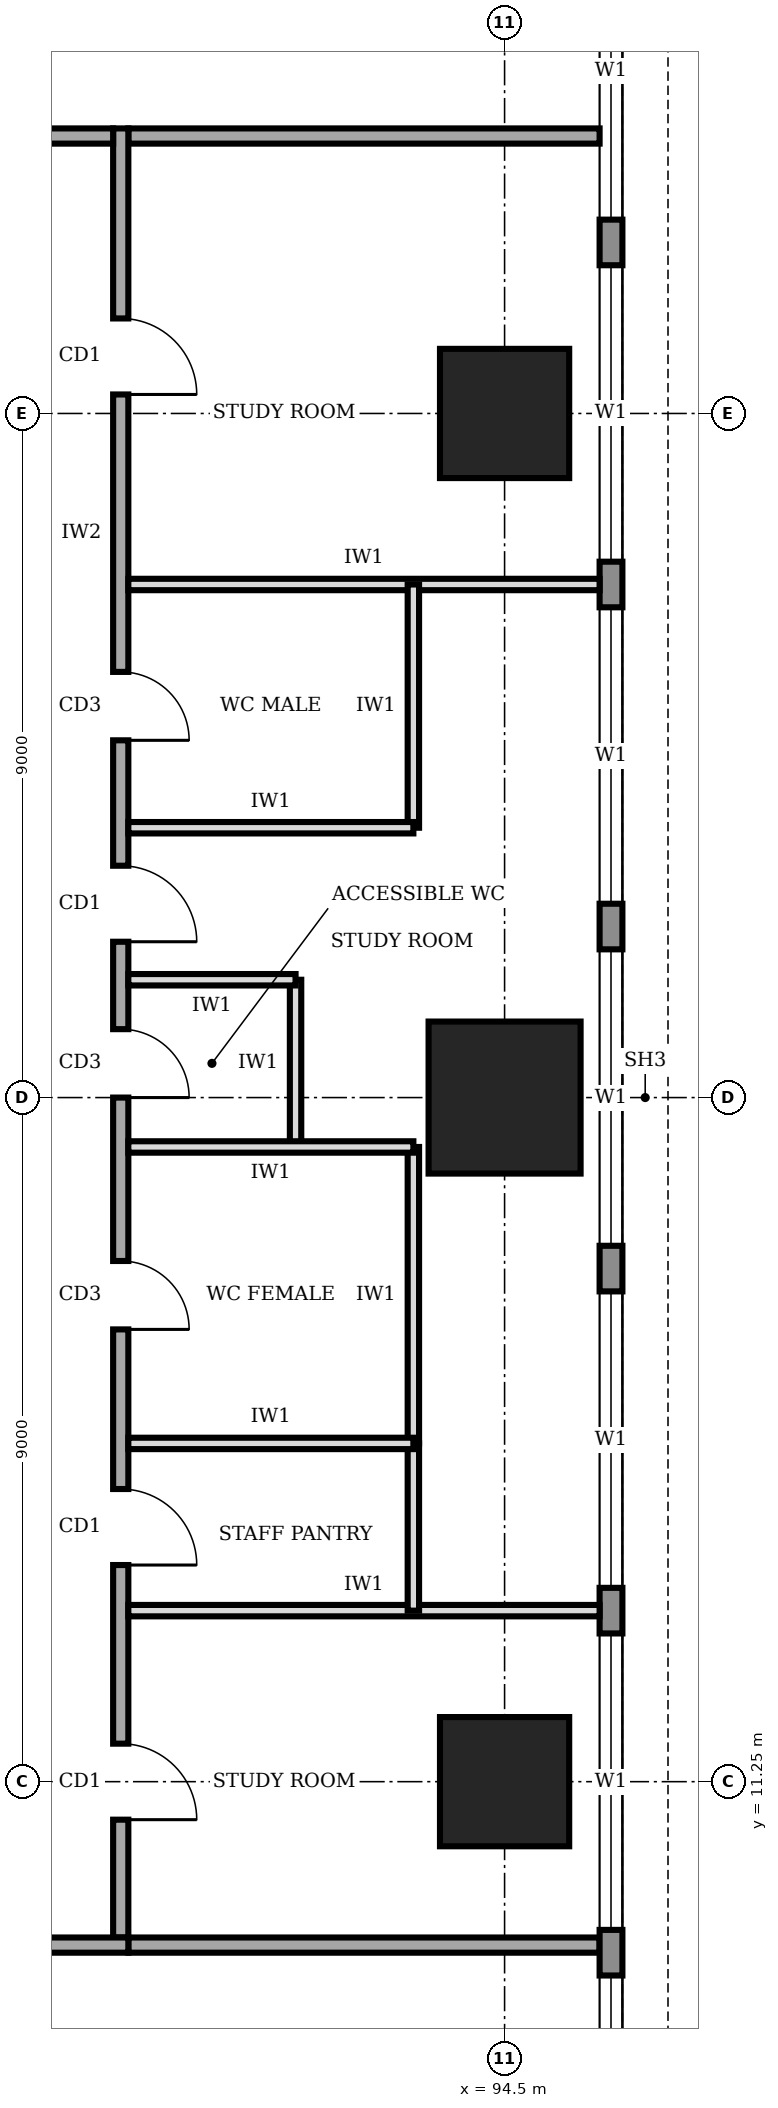
"""IFC4 building model, lengths in metres.
Left out: names, types, materials, properties, quantities, classifications, styles, units other than length and angle.
Written with IfcOpenShell. Run it as: python <this file> out.ifc"""

import sys

from ifc_helpers import new_model, si_unit, direction, frame, frame_2d, origin, origin_2d, place, context, subcontext, project, spatial, rectangle, extrude, element, fill, save


model = new_model("IFC4")
c1 = context("Model", 3, precision=1e-05, world=origin(), true_north=direction((0.0, 1.0)))
c2 = subcontext(c1, "Body", "Model", "MODEL_VIEW")
j1 = project(units=[si_unit("LENGTHUNIT", "METRE"), si_unit("PLANEANGLEUNIT", "RADIAN")], contexts=[c1])
p1 = place(None, origin())
s1 = spatial("IfcSite", under=j1, at=p1, CompositionType="ELEMENT")
p2 = place(p1, origin())
s2 = spatial("IfcBuilding", under=s1, at=p2, CompositionType="ELEMENT")
p3 = place(p2, frame((0.0, 0.0, 221.0)))
s3 = spatial("IfcBuildingStorey", under=s2, at=p3, CompositionType="ELEMENT", Elevation=221.0)
p4 = place(p3, frame((94.5, 11.25, 0.0), z_axis=(0.0, 0.0, 1.0), x_axis=(1.0, 0.0, 0.0)))
e1 = element("IfcColumn", 1, at=p4, inside=s3, PredefinedType="COLUMN", context=c2, shape_type="SweptSolid", body=[
    extrude(rectangle(XDim=1.7, YDim=1.7, at=origin_2d()), origin(), (0.0, 0.0, 1.0), 4.0),
])
p5 = place(p3, frame((94.5, 20.25, 0.0), z_axis=(0.0, 0.0, 1.0), x_axis=(1.0, 0.0, 0.0)))
e2 = element("IfcColumn", 2, at=p5, inside=s3, PredefinedType="COLUMN", context=c2, shape_type="SweptSolid", body=[
    extrude(rectangle(XDim=2.0, YDim=2.0, at=origin_2d()), origin(), (0.0, 0.0, 1.0), 4.0),
])
p6 = place(p3, frame((94.5, 29.25, 0.0), z_axis=(0.0, 0.0, 1.0), x_axis=(1.0, 0.0, 0.0)))
e3 = element("IfcColumn", 3, at=p6, inside=s3, PredefinedType="COLUMN", context=c2, shape_type="SweptSolid", body=[
    extrude(rectangle(XDim=1.7, YDim=1.7, at=origin_2d()), origin(), (0.0, 0.0, 1.0), 4.0),
])
p7 = place(p3, frame((95.9, 3.32, 0.0), z_axis=(0.0, 0.0, 1.0), x_axis=(0.0, 1.0, 0.0)))
e4 = element("IfcWall", 4, at=p7, inside=s3, PredefinedType="STANDARD", context=c2, shape_type="SweptSolid", body=[
    extrude(rectangle(XDim=33.86, YDim=0.3, at=frame_2d((16.93, 0.0))), origin(), (0.0, 0.0, 1.0), 3.75),
])
p8 = place(p7, frame((1.48, 0.0, 0.9)))
e5 = element("IfcOpeningElement", 5, at=p8, cuts=e4, PredefinedType="OPENING", context=c2, shape_type="SweptSolid", body=[
    extrude(rectangle(XDim=3.9, YDim=2.2, at=frame_2d((1.95, 1.1))), frame((0.0, 0.16, 0.0), z_axis=(0.0, -1.0, 0.0), x_axis=(1.0, 0.0, 0.0)), (0.0, 0.0, 1.0), 0.32),
])
p9 = place(p7, frame((5.98, 0.0, 0.9)))
e6 = element("IfcOpeningElement", 6, at=p9, cuts=e4, PredefinedType="OPENING", context=c2, shape_type="SweptSolid", body=[
    extrude(rectangle(XDim=3.9, YDim=2.2, at=frame_2d((1.95, 1.1))), frame((0.0, 0.16, 0.0), z_axis=(0.0, -1.0, 0.0), x_axis=(1.0, 0.0, 0.0)), (0.0, 0.0, 1.0), 0.32),
])
p10 = place(p7, frame((10.48, 0.0, 0.9)))
e7 = element("IfcOpeningElement", 7, at=p10, cuts=e4, PredefinedType="OPENING", context=c2, shape_type="SweptSolid", body=[
    extrude(rectangle(XDim=3.9, YDim=2.2, at=frame_2d((1.95, 1.1))), frame((0.0, 0.16, 0.0), z_axis=(0.0, -1.0, 0.0), x_axis=(1.0, 0.0, 0.0)), (0.0, 0.0, 1.0), 0.32),
])
p11 = place(p7, frame((14.98, 0.0, 0.9)))
e8 = element("IfcOpeningElement", 8, at=p11, cuts=e4, PredefinedType="OPENING", context=c2, shape_type="SweptSolid", body=[
    extrude(rectangle(XDim=3.9, YDim=2.2, at=frame_2d((1.95, 1.1))), frame((0.0, 0.16, 0.0), z_axis=(0.0, -1.0, 0.0), x_axis=(1.0, 0.0, 0.0)), (0.0, 0.0, 1.0), 0.32),
])
p12 = place(p7, frame((19.48, 0.0, 0.9)))
e9 = element("IfcOpeningElement", 9, at=p12, cuts=e4, PredefinedType="OPENING", context=c2, shape_type="SweptSolid", body=[
    extrude(rectangle(XDim=3.9, YDim=2.2, at=frame_2d((1.95, 1.1))), frame((0.0, 0.16, 0.0), z_axis=(0.0, -1.0, 0.0), x_axis=(1.0, 0.0, 0.0)), (0.0, 0.0, 1.0), 0.32),
])
p13 = place(p7, frame((23.98, 0.0, 0.9)))
e10 = element("IfcOpeningElement", 10, at=p13, cuts=e4, PredefinedType="OPENING", context=c2, shape_type="SweptSolid", body=[
    extrude(rectangle(XDim=3.9, YDim=2.2, at=frame_2d((1.95, 1.1))), frame((0.0, 0.16, 0.0), z_axis=(0.0, -1.0, 0.0), x_axis=(1.0, 0.0, 0.0)), (0.0, 0.0, 1.0), 0.32),
])
p14 = place(p7, frame((28.48, 0.0, 0.9)))
e11 = element("IfcOpeningElement", 11, at=p14, cuts=e4, PredefinedType="OPENING", context=c2, shape_type="SweptSolid", body=[
    extrude(rectangle(XDim=3.9, YDim=2.2, at=frame_2d((1.95, 1.1))), frame((0.0, 0.16, 0.0), z_axis=(0.0, -1.0, 0.0), x_axis=(1.0, 0.0, 0.0)), (0.0, 0.0, 1.0), 0.32),
])
p15 = place(p3, frame((72.65, 9.1, 0.0), z_axis=(0.0, 0.0, 1.0), x_axis=(1.0, 0.0, 0.0)))
e12 = element("IfcWall", 12, at=p15, inside=s3, PredefinedType="SOLIDWALL", context=c2, shape_type="SweptSolid", body=[
    extrude(rectangle(XDim=16.9, YDim=0.2, at=frame_2d((8.45, 0.0))), origin(), (0.0, 0.0, 1.0), 3.75),
])
p16 = place(p3, frame((89.45, 9.2, 0.0), z_axis=(0.0, 0.0, 1.0), x_axis=(0.0, 1.0, 0.0)))
e13 = element("IfcWall", 13, at=p16, inside=s3, PredefinedType="SOLIDWALL", context=c2, shape_type="SweptSolid", body=[
    extrude(rectangle(XDim=23.8, YDim=0.2, at=frame_2d((11.9, 0.0))), origin(), (0.0, 0.0, 1.0), 3.75),
])
p17 = place(p16, frame((1.55, 0.0, 0.0)))
e14 = element("IfcOpeningElement", 14, at=p17, cuts=e13, PredefinedType="OPENING", context=c2, shape_type="SweptSolid", body=[
    extrude(rectangle(XDim=1.0, YDim=2.1, at=frame_2d((0.5, 1.05))), frame((0.0, 0.11, 0.0), z_axis=(0.0, -1.0, 0.0), x_axis=(1.0, 0.0, 0.0)), (0.0, 0.0, 1.0), 0.22),
])
p18 = place(p16, frame((4.9, 0.0, 0.0)))
e15 = element("IfcOpeningElement", 15, at=p18, cuts=e13, PredefinedType="OPENING", context=c2, shape_type="SweptSolid", body=[
    extrude(rectangle(XDim=1.0, YDim=2.1, at=frame_2d((0.5, 1.05))), frame((0.0, 0.11, 0.0), z_axis=(0.0, -1.0, 0.0), x_axis=(1.0, 0.0, 0.0)), (0.0, 0.0, 1.0), 0.22),
])
p19 = place(p16, frame((8.0, 0.0, 0.0)))
e16 = element("IfcOpeningElement", 16, at=p19, cuts=e13, PredefinedType="OPENING", context=c2, shape_type="SweptSolid", body=[
    extrude(rectangle(XDim=0.9, YDim=2.1, at=frame_2d((0.45, 1.05))), frame((0.0, 0.11, 0.0), z_axis=(0.0, -1.0, 0.0), x_axis=(1.0, 0.0, 0.0)), (0.0, 0.0, 1.0), 0.22),
])
p20 = place(p16, frame((11.05, 0.0, 0.0)))
e17 = element("IfcOpeningElement", 17, at=p20, cuts=e13, PredefinedType="OPENING", context=c2, shape_type="SweptSolid", body=[
    extrude(rectangle(XDim=0.9, YDim=2.1, at=frame_2d((0.45, 1.05))), frame((0.0, 0.11, 0.0), z_axis=(0.0, -1.0, 0.0), x_axis=(1.0, 0.0, 0.0)), (0.0, 0.0, 1.0), 0.22),
])
p21 = place(p16, frame((15.75, 0.0, 0.0)))
e18 = element("IfcOpeningElement", 18, at=p21, cuts=e13, PredefinedType="OPENING", context=c2, shape_type="SweptSolid", body=[
    extrude(rectangle(XDim=0.9, YDim=2.1, at=frame_2d((0.45, 1.05))), frame((0.0, 0.11, 0.0), z_axis=(0.0, -1.0, 0.0), x_axis=(1.0, 0.0, 0.0)), (0.0, 0.0, 1.0), 0.22),
])
p22 = place(p16, frame((13.1, 0.0, 0.0)))
e19 = element("IfcOpeningElement", 19, at=p22, cuts=e13, PredefinedType="OPENING", context=c2, shape_type="SweptSolid", body=[
    extrude(rectangle(XDim=1.0, YDim=2.1, at=frame_2d((0.5, 1.05))), frame((0.0, 0.11, 0.0), z_axis=(0.0, -1.0, 0.0), x_axis=(1.0, 0.0, 0.0)), (0.0, 0.0, 1.0), 0.22),
])
p23 = place(p16, frame((20.3, 0.0, 0.0)))
e20 = element("IfcOpeningElement", 20, at=p23, cuts=e13, PredefinedType="OPENING", context=c2, shape_type="SweptSolid", body=[
    extrude(rectangle(XDim=1.0, YDim=2.1, at=frame_2d((0.5, 1.05))), frame((0.0, 0.11, 0.0), z_axis=(0.0, -1.0, 0.0), x_axis=(1.0, 0.0, 0.0)), (0.0, 0.0, 1.0), 0.22),
])
p24 = place(p3, frame((89.35, 32.9, 0.0), z_axis=(0.0, 0.0, 1.0), x_axis=(-1.0, 0.0, 0.0)))
e21 = element("IfcWall", 21, at=p24, inside=s3, PredefinedType="SOLIDWALL", context=c2, shape_type="SweptSolid", body=[
    extrude(rectangle(XDim=16.9, YDim=0.2, at=frame_2d((8.45, 0.0))), origin(), (0.0, 0.0, 1.0), 3.75),
])
p25 = place(p24, frame((14.375, 0.0, 0.0)))
e22 = element("IfcOpeningElement", 22, at=p25, cuts=e21, PredefinedType="OPENING", context=c2, shape_type="SweptSolid", body=[
    extrude(rectangle(XDim=1.0, YDim=2.1, at=frame_2d((0.5, 1.05))), frame((0.0, 0.11, 0.0), z_axis=(0.0, -1.0, 0.0), x_axis=(1.0, 0.0, 0.0)), (0.0, 0.0, 1.0), 0.22),
])
p26 = place(p24, frame((1.325, 0.0, 0.0)))
e23 = element("IfcOpeningElement", 23, at=p26, cuts=e21, PredefinedType="OPENING", context=c2, shape_type="SweptSolid", body=[
    extrude(rectangle(XDim=1.0, YDim=2.1, at=frame_2d((0.5, 1.05))), frame((0.0, 0.11, 0.0), z_axis=(0.0, -1.0, 0.0), x_axis=(1.0, 0.0, 0.0)), (0.0, 0.0, 1.0), 0.22),
])
for number, where, z_axis, x_axis in (
    (24, (89.55, 9.1, 0.0), (0.0, 0.0, 1.0), (1.0, 0.0, 0.0)),
    (25, (89.55, 32.9, 0.0), (0.0, 0.0, 1.0), (1.0, 0.0, 0.0)),
):
    element("IfcWall", number, at=place(p3, frame(where, z_axis=z_axis, x_axis=x_axis)), inside=s3, PredefinedType="SOLIDWALL", context=c2, shape_type="SweptSolid", body=[
        extrude(rectangle(XDim=6.2, YDim=0.2, at=frame_2d((3.1, 0.0))), origin(), (0.0, 0.0, 1.0), 3.75),
    ])
for number, where, z_axis, x_axis in (
    (26, (89.55, 13.5, 0.0), (0.0, 0.0, 1.0), (1.0, 0.0, 0.0)),
    (27, (89.55, 27.0, 0.0), (0.0, 0.0, 1.0), (1.0, 0.0, 0.0)),
):
    element("IfcWall", number, at=place(p3, frame(where, z_axis=z_axis, x_axis=x_axis)), inside=s3, PredefinedType="PARTITIONING", context=c2, shape_type="SweptSolid", body=[
        extrude(rectangle(XDim=6.2, YDim=0.15, at=frame_2d((3.1, 0.0))), origin(), (0.0, 0.0, 1.0), 3.75),
    ])
p27 = place(p3, frame((89.55, 15.7, 0.0), z_axis=(0.0, 0.0, 1.0), x_axis=(1.0, 0.0, 0.0)))
e28 = element("IfcWall", 28, at=p27, inside=s3, PredefinedType="PARTITIONING", context=c2, shape_type="SweptSolid", body=[
    extrude(rectangle(XDim=3.75, YDim=0.15, at=frame_2d((1.875, 0.0))), origin(), (0.0, 0.0, 1.0), 3.75),
])
p28 = place(p3, frame((89.55, 19.6, 0.0), z_axis=(0.0, 0.0, 1.0), x_axis=(1.0, 0.0, 0.0)))
e29 = element("IfcWall", 29, at=p28, inside=s3, PredefinedType="PARTITIONING", context=c2, shape_type="SweptSolid", body=[
    extrude(rectangle(XDim=3.75, YDim=0.15, at=frame_2d((1.875, 0.0))), origin(), (0.0, 0.0, 1.0), 2.85),
])
p29 = place(p3, frame((89.55, 21.8, 0.0), z_axis=(0.0, 0.0, 1.0), x_axis=(1.0, 0.0, 0.0)))
e30 = element("IfcWall", 30, at=p29, inside=s3, PredefinedType="PARTITIONING", context=c2, shape_type="SweptSolid", body=[
    extrude(rectangle(XDim=2.2, YDim=0.15, at=frame_2d((1.1, 0.0))), origin(), (0.0, 0.0, 1.0), 3.75),
])
p30 = place(p3, frame((89.55, 23.8, 0.0), z_axis=(0.0, 0.0, 1.0), x_axis=(1.0, 0.0, 0.0)))
e31 = element("IfcWall", 31, at=p30, inside=s3, PredefinedType="PARTITIONING", context=c2, shape_type="SweptSolid", body=[
    extrude(rectangle(XDim=3.75, YDim=0.15, at=frame_2d((1.875, 0.0))), origin(), (0.0, 0.0, 1.0), 3.75),
])
p31 = place(p3, frame((93.3, 13.5, 0.0), z_axis=(0.0, 0.0, 1.0), x_axis=(0.0, 1.0, 0.0)))
e32 = element("IfcWall", 32, at=p31, inside=s3, PredefinedType="PARTITIONING", context=c2, shape_type="SweptSolid", body=[
    extrude(rectangle(XDim=2.2, YDim=0.15, at=frame_2d((1.1, 0.0))), origin(), (0.0, 0.0, 1.0), 3.75),
])
p32 = place(p3, frame((93.3, 15.7, 0.0), z_axis=(0.0, 0.0, 1.0), x_axis=(0.0, 1.0, 0.0)))
e33 = element("IfcWall", 33, at=p32, inside=s3, PredefinedType="PARTITIONING", context=c2, shape_type="SweptSolid", body=[
    extrude(rectangle(XDim=3.9, YDim=0.15, at=frame_2d((1.95, 0.0))), origin(), (0.0, 0.0, 1.0), 3.75),
])
p33 = place(p3, frame((91.75, 19.6, 0.0), z_axis=(0.0, 0.0, 1.0), x_axis=(0.0, 1.0, 0.0)))
e34 = element("IfcWall", 34, at=p33, inside=s3, PredefinedType="PARTITIONING", context=c2, shape_type="SweptSolid", body=[
    extrude(rectangle(XDim=2.2, YDim=0.15, at=frame_2d((1.1, 0.0))), origin(), (0.0, 0.0, 1.0), 3.75),
])
p34 = place(p3, frame((93.3, 23.8, 0.0), z_axis=(0.0, 0.0, 1.0), x_axis=(0.0, 1.0, 0.0)))
e35 = element("IfcWall", 35, at=p34, inside=s3, PredefinedType="PARTITIONING", context=c2, shape_type="SweptSolid", body=[
    extrude(rectangle(XDim=3.2, YDim=0.15, at=frame_2d((1.6, 0.0))), origin(), (0.0, 0.0, 1.0), 3.75),
])
p35 = place(p8, origin())
e36 = element("IfcWindow", 36, at=p35, inside=s3, PartitioningType="SINGLE_PANEL", PredefinedType="WINDOW", context=c2, shape_type="SweptSolid", body=[
    extrude(rectangle(XDim=3.9, YDim=2.2, at=frame_2d((1.95, 1.1))), frame((0.0, 0.03, 0.0), z_axis=(0.0, -1.0, 0.0), x_axis=(1.0, 0.0, 0.0)), (0.0, 0.0, 1.0), 0.06),
])
fill(e5, e36)
p36 = place(p9, origin())
e37 = element("IfcWindow", 37, at=p36, inside=s3, PartitioningType="SINGLE_PANEL", PredefinedType="WINDOW", context=c2, shape_type="SweptSolid", body=[
    extrude(rectangle(XDim=3.9, YDim=2.2, at=frame_2d((1.95, 1.1))), frame((0.0, 0.03, 0.0), z_axis=(0.0, -1.0, 0.0), x_axis=(1.0, 0.0, 0.0)), (0.0, 0.0, 1.0), 0.06),
])
fill(e6, e37)
p37 = place(p10, origin())
e38 = element("IfcWindow", 38, at=p37, inside=s3, PartitioningType="SINGLE_PANEL", PredefinedType="WINDOW", context=c2, shape_type="SweptSolid", body=[
    extrude(rectangle(XDim=3.9, YDim=2.2, at=frame_2d((1.95, 1.1))), frame((0.0, 0.03, 0.0), z_axis=(0.0, -1.0, 0.0), x_axis=(1.0, 0.0, 0.0)), (0.0, 0.0, 1.0), 0.06),
])
fill(e7, e38)
p38 = place(p11, origin())
e39 = element("IfcWindow", 39, at=p38, inside=s3, PartitioningType="SINGLE_PANEL", PredefinedType="WINDOW", context=c2, shape_type="SweptSolid", body=[
    extrude(rectangle(XDim=3.9, YDim=2.2, at=frame_2d((1.95, 1.1))), frame((0.0, 0.03, 0.0), z_axis=(0.0, -1.0, 0.0), x_axis=(1.0, 0.0, 0.0)), (0.0, 0.0, 1.0), 0.06),
])
fill(e8, e39)
p39 = place(p12, origin())
e40 = element("IfcWindow", 40, at=p39, inside=s3, PartitioningType="SINGLE_PANEL", PredefinedType="WINDOW", context=c2, shape_type="SweptSolid", body=[
    extrude(rectangle(XDim=3.9, YDim=2.2, at=frame_2d((1.95, 1.1))), frame((0.0, 0.03, 0.0), z_axis=(0.0, -1.0, 0.0), x_axis=(1.0, 0.0, 0.0)), (0.0, 0.0, 1.0), 0.06),
])
fill(e9, e40)
p40 = place(p13, origin())
e41 = element("IfcWindow", 41, at=p40, inside=s3, PartitioningType="SINGLE_PANEL", PredefinedType="WINDOW", context=c2, shape_type="SweptSolid", body=[
    extrude(rectangle(XDim=3.9, YDim=2.2, at=frame_2d((1.95, 1.1))), frame((0.0, 0.03, 0.0), z_axis=(0.0, -1.0, 0.0), x_axis=(1.0, 0.0, 0.0)), (0.0, 0.0, 1.0), 0.06),
])
fill(e10, e41)
p41 = place(p14, origin())
e42 = element("IfcWindow", 42, at=p41, inside=s3, PartitioningType="SINGLE_PANEL", PredefinedType="WINDOW", context=c2, shape_type="SweptSolid", body=[
    extrude(rectangle(XDim=3.9, YDim=2.2, at=frame_2d((1.95, 1.1))), frame((0.0, 0.03, 0.0), z_axis=(0.0, -1.0, 0.0), x_axis=(1.0, 0.0, 0.0)), (0.0, 0.0, 1.0), 0.06),
])
fill(e11, e42)
p42 = place(p17, frame((1.0, 0.0, 0.0), z_axis=(0.0, 0.0, 1.0), x_axis=(-1.0, 0.0, 0.0)))
e43 = element("IfcDoor", 43, at=p42, inside=s3, OperationType="SINGLE_SWING_RIGHT", PredefinedType="DOOR", context=c2, shape_type="SweptSolid", body=[
    extrude(rectangle(XDim=1.0, YDim=2.1, at=frame_2d((0.5, 1.05))), frame((0.0, 0.025, 0.0), z_axis=(0.0, -1.0, 0.0), x_axis=(1.0, 0.0, 0.0)), (0.0, 0.0, 1.0), 0.05),
])
fill(e14, e43)
p43 = place(p18, frame((1.0, 0.0, 0.0), z_axis=(0.0, 0.0, 1.0), x_axis=(-1.0, 0.0, 0.0)))
e44 = element("IfcDoor", 44, at=p43, inside=s3, OperationType="SINGLE_SWING_RIGHT", PredefinedType="DOOR", context=c2, shape_type="SweptSolid", body=[
    extrude(rectangle(XDim=1.0, YDim=2.1, at=frame_2d((0.5, 1.05))), frame((0.0, 0.025, 0.0), z_axis=(0.0, -1.0, 0.0), x_axis=(1.0, 0.0, 0.0)), (0.0, 0.0, 1.0), 0.05),
])
fill(e15, e44)
p44 = place(p19, frame((0.9, 0.0, 0.0), z_axis=(0.0, 0.0, 1.0), x_axis=(-1.0, 0.0, 0.0)))
e45 = element("IfcDoor", 45, at=p44, inside=s3, OperationType="SINGLE_SWING_RIGHT", PredefinedType="DOOR", context=c2, shape_type="SweptSolid", body=[
    extrude(rectangle(XDim=0.9, YDim=2.1, at=frame_2d((0.45, 1.05))), frame((0.0, 0.025, 0.0), z_axis=(0.0, -1.0, 0.0), x_axis=(1.0, 0.0, 0.0)), (0.0, 0.0, 1.0), 0.05),
])
fill(e16, e45)
p45 = place(p20, frame((0.9, 0.0, 0.0), z_axis=(0.0, 0.0, 1.0), x_axis=(-1.0, 0.0, 0.0)))
e46 = element("IfcDoor", 46, at=p45, inside=s3, OperationType="SINGLE_SWING_RIGHT", PredefinedType="DOOR", context=c2, shape_type="SweptSolid", body=[
    extrude(rectangle(XDim=0.9, YDim=2.1, at=frame_2d((0.45, 1.05))), frame((0.0, 0.025, 0.0), z_axis=(0.0, -1.0, 0.0), x_axis=(1.0, 0.0, 0.0)), (0.0, 0.0, 1.0), 0.05),
])
fill(e17, e46)
p46 = place(p21, frame((0.9, 0.0, 0.0), z_axis=(0.0, 0.0, 1.0), x_axis=(-1.0, 0.0, 0.0)))
e47 = element("IfcDoor", 47, at=p46, inside=s3, OperationType="SINGLE_SWING_RIGHT", PredefinedType="DOOR", context=c2, shape_type="SweptSolid", body=[
    extrude(rectangle(XDim=0.9, YDim=2.1, at=frame_2d((0.45, 1.05))), frame((0.0, 0.025, 0.0), z_axis=(0.0, -1.0, 0.0), x_axis=(1.0, 0.0, 0.0)), (0.0, 0.0, 1.0), 0.05),
])
fill(e18, e47)
p47 = place(p22, frame((1.0, 0.0, 0.0), z_axis=(0.0, 0.0, 1.0), x_axis=(-1.0, 0.0, 0.0)))
e48 = element("IfcDoor", 48, at=p47, inside=s3, OperationType="SINGLE_SWING_RIGHT", PredefinedType="DOOR", context=c2, shape_type="SweptSolid", body=[
    extrude(rectangle(XDim=1.0, YDim=2.1, at=frame_2d((0.5, 1.05))), frame((0.0, 0.025, 0.0), z_axis=(0.0, -1.0, 0.0), x_axis=(1.0, 0.0, 0.0)), (0.0, 0.0, 1.0), 0.05),
])
fill(e19, e48)
p48 = place(p23, frame((1.0, 0.0, 0.0), z_axis=(0.0, 0.0, 1.0), x_axis=(-1.0, 0.0, 0.0)))
e49 = element("IfcDoor", 49, at=p48, inside=s3, OperationType="SINGLE_SWING_RIGHT", PredefinedType="DOOR", context=c2, shape_type="SweptSolid", body=[
    extrude(rectangle(XDim=1.0, YDim=2.1, at=frame_2d((0.5, 1.05))), frame((0.0, 0.025, 0.0), z_axis=(0.0, -1.0, 0.0), x_axis=(1.0, 0.0, 0.0)), (0.0, 0.0, 1.0), 0.05),
])
fill(e20, e49)
save(model, sys.argv[1])
